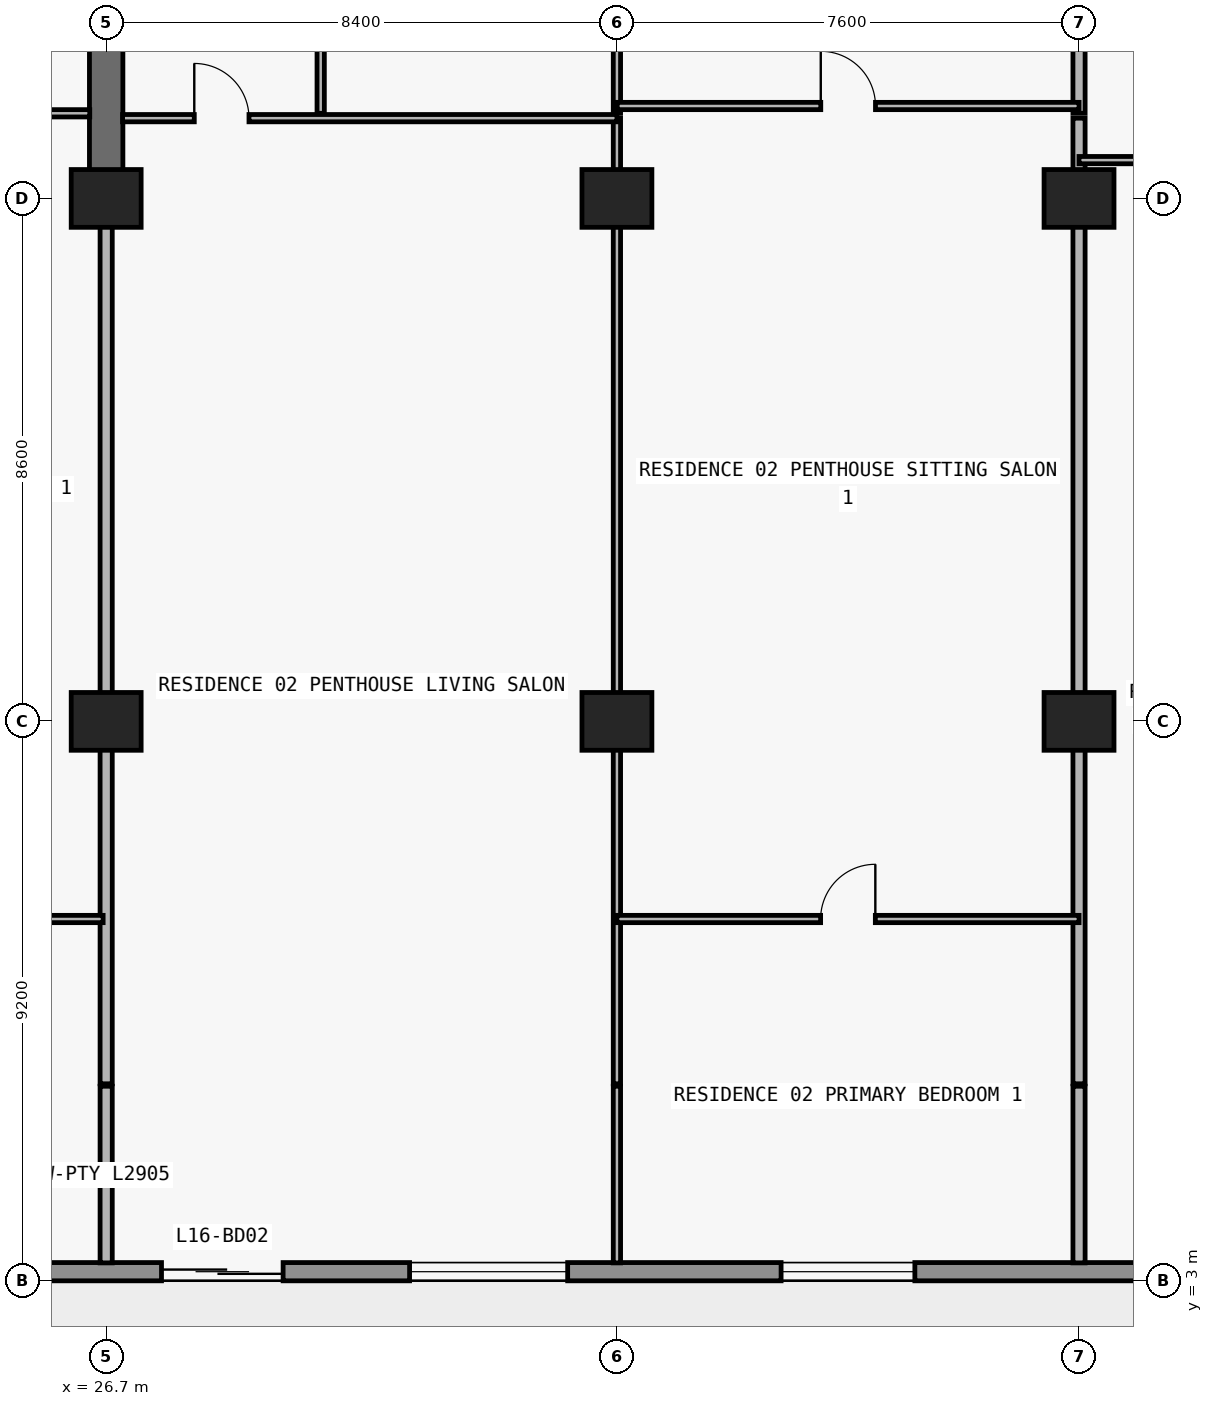
"""IFC4 building model, lengths in metres.
Left out: names, types, materials, properties, quantities, classifications, styles, units other than length and angle.
Written with IfcOpenShell. Run it as: python <this file> out.ifc"""

import sys

from ifc_helpers import new_model, si_unit, direction, frame, frame_2d, origin, origin_2d, place, context, subcontext, project, spatial, rectangle, extrude, element, fill, save


model = new_model("IFC4")
c1 = context("Model", 3, precision=1e-05, world=origin(), true_north=direction((0.0, 1.0)))
c2 = subcontext(c1, "Body", "Model", "MODEL_VIEW")
j1 = project(units=[si_unit("LENGTHUNIT", "METRE"), si_unit("PLANEANGLEUNIT", "RADIAN")], contexts=[c1])
p1 = place(None, origin())
s1 = spatial("IfcSite", under=j1, at=p1, CompositionType="ELEMENT")
p2 = place(p1, origin())
s2 = spatial("IfcBuilding", under=s1, at=p2, CompositionType="ELEMENT")
p3 = place(p2, frame((0.0, 0.0, 63.0)))
s3 = spatial("IfcBuildingStorey", under=s2, at=p3, CompositionType="ELEMENT", Elevation=63.0)
for number, where, z_axis, x_axis in (
    (1, (26.7, 12.2, 0.0), (0.0, 0.0, 1.0), (1.0, 0.0, 0.0)),
    (2, (35.1, 12.2, 0.0), (0.0, 0.0, 1.0), (1.0, 0.0, 0.0)),
    (3, (42.7, 12.2, 0.0), (0.0, 0.0, 1.0), (1.0, 0.0, 0.0)),
    (4, (26.7, 20.8, 0.0), (0.0, 0.0, 1.0), (1.0, 0.0, 0.0)),
    (5, (35.1, 20.8, 0.0), (0.0, 0.0, 1.0), (1.0, 0.0, 0.0)),
    (6, (42.7, 20.8, 0.0), (0.0, 0.0, 1.0), (1.0, 0.0, 0.0)),
):
    element("IfcColumn", number, at=place(p3, frame(where, z_axis=z_axis, x_axis=x_axis)), inside=s3, PredefinedType="COLUMN", context=c2, shape_type="SweptSolid", body=[
        extrude(rectangle(XDim=1.15, YDim=0.95, at=origin_2d()), origin(), (0.0, 0.0, 1.0), 3.05),
    ])
p4 = place(p3, frame((26.7, 20.8, 0.0), z_axis=(0.0, 0.0, 1.0), x_axis=(0.0, 1.0, 0.0)))
e7 = element("IfcWall", 7, at=p4, inside=s3, PredefinedType="SHEAR", context=c2, shape_type="SweptSolid", body=[
    extrude(rectangle(XDim=8.6, YDim=0.55, at=frame_2d((4.3, 0.0))), origin(), (0.0, 0.0, 1.0), 3.05),
])
p5 = place(p3, frame((72.7, 3.15, 0.0), z_axis=(0.0, 0.0, 1.0), x_axis=(-1.0, 0.0, 0.0)))
e8 = element("IfcWall", 8, at=p5, inside=s3, PredefinedType="STANDARD", context=c2, shape_type="SweptSolid", body=[
    extrude(rectangle(XDim=67.6, YDim=0.3, at=frame_2d((33.8, 0.0))), origin(), (0.0, 0.0, 1.0), 3.05),
])
p6 = place(p5, frame((59.89, 0.0, 0.0)))
e9 = element("IfcOpeningElement", 9, at=p6, cuts=e8, PredefinedType="OPENING", context=c2, shape_type="SweptSolid", body=[
    extrude(rectangle(XDim=2.0, YDim=2.3, at=frame_2d((1.0, 1.15))), frame((0.0, 0.16, 0.0), z_axis=(0.0, -1.0, 0.0), x_axis=(1.0, 0.0, 0.0)), (0.0, 0.0, 1.0), 0.32),
])
p7 = place(p5, frame((55.21, 0.0, 0.65)))
e10 = element("IfcOpeningElement", 10, at=p7, cuts=e8, PredefinedType="OPENING", context=c2, shape_type="SweptSolid", body=[
    extrude(rectangle(XDim=2.6, YDim=1.85, at=frame_2d((1.3, 0.925))), frame((0.0, 0.16, 0.0), z_axis=(0.0, -1.0, 0.0), x_axis=(1.0, 0.0, 0.0)), (0.0, 0.0, 1.0), 0.32),
])
p8 = place(p5, frame((49.1, 0.0, 0.85)))
e11 = element("IfcOpeningElement", 11, at=p8, cuts=e8, PredefinedType="OPENING", context=c2, shape_type="SweptSolid", body=[
    extrude(rectangle(XDim=2.2, YDim=1.55, at=frame_2d((1.1, 0.775))), frame((0.0, 0.16, 0.0), z_axis=(0.0, -1.0, 0.0), x_axis=(1.0, 0.0, 0.0)), (0.0, 0.0, 1.0), 0.32),
])
p9 = place(p5, frame((43.09, 0.0, 0.0)))
e12 = element("IfcOpeningElement", 12, at=p9, cuts=e8, PredefinedType="OPENING", context=c2, shape_type="SweptSolid", body=[
    extrude(rectangle(XDim=2.0, YDim=2.3, at=frame_2d((1.0, 1.15))), frame((0.0, 0.16, 0.0), z_axis=(0.0, -1.0, 0.0), x_axis=(1.0, 0.0, 0.0)), (0.0, 0.0, 1.0), 0.32),
])
p10 = place(p5, frame((38.41, 0.0, 0.65)))
e13 = element("IfcOpeningElement", 13, at=p10, cuts=e8, PredefinedType="OPENING", context=c2, shape_type="SweptSolid", body=[
    extrude(rectangle(XDim=2.6, YDim=1.85, at=frame_2d((1.3, 0.925))), frame((0.0, 0.16, 0.0), z_axis=(0.0, -1.0, 0.0), x_axis=(1.0, 0.0, 0.0)), (0.0, 0.0, 1.0), 0.32),
])
p11 = place(p5, frame((32.7, 0.0, 0.85)))
e14 = element("IfcOpeningElement", 14, at=p11, cuts=e8, PredefinedType="OPENING", context=c2, shape_type="SweptSolid", body=[
    extrude(rectangle(XDim=2.2, YDim=1.55, at=frame_2d((1.1, 0.775))), frame((0.0, 0.16, 0.0), z_axis=(0.0, -1.0, 0.0), x_axis=(1.0, 0.0, 0.0)), (0.0, 0.0, 1.0), 0.32),
])
p12 = place(p5, frame((27.026, 0.0, 0.0)))
e15 = element("IfcOpeningElement", 15, at=p12, cuts=e8, PredefinedType="OPENING", context=c2, shape_type="SweptSolid", body=[
    extrude(rectangle(XDim=2.0, YDim=2.3, at=frame_2d((1.0, 1.15))), frame((0.0, 0.16, 0.0), z_axis=(0.0, -1.0, 0.0), x_axis=(1.0, 0.0, 0.0)), (0.0, 0.0, 1.0), 0.32),
])
p13 = place(p5, frame((22.726, 0.0, 0.85)))
e16 = element("IfcOpeningElement", 16, at=p13, cuts=e8, PredefinedType="OPENING", context=c2, shape_type="SweptSolid", body=[
    extrude(rectangle(XDim=2.2, YDim=1.55, at=frame_2d((1.1, 0.775))), frame((0.0, 0.16, 0.0), z_axis=(0.0, -1.0, 0.0), x_axis=(1.0, 0.0, 0.0)), (0.0, 0.0, 1.0), 0.32),
])
p14 = place(p5, frame((18.29, 0.0, 0.0)))
e17 = element("IfcOpeningElement", 17, at=p14, cuts=e8, PredefinedType="OPENING", context=c2, shape_type="SweptSolid", body=[
    extrude(rectangle(XDim=2.0, YDim=2.3, at=frame_2d((1.0, 1.15))), frame((0.0, 0.16, 0.0), z_axis=(0.0, -1.0, 0.0), x_axis=(1.0, 0.0, 0.0)), (0.0, 0.0, 1.0), 0.32),
])
p15 = place(p5, frame((14.19, 0.0, 0.85)))
e18 = element("IfcOpeningElement", 18, at=p15, cuts=e8, PredefinedType="OPENING", context=c2, shape_type="SweptSolid", body=[
    extrude(rectangle(XDim=1.8, YDim=1.55, at=frame_2d((0.9, 0.775))), frame((0.0, 0.16, 0.0), z_axis=(0.0, -1.0, 0.0), x_axis=(1.0, 0.0, 0.0)), (0.0, 0.0, 1.0), 0.32),
])
p16 = place(p5, frame((10.226, 0.0, 0.0)))
e19 = element("IfcOpeningElement", 19, at=p16, cuts=e8, PredefinedType="OPENING", context=c2, shape_type="SweptSolid", body=[
    extrude(rectangle(XDim=2.0, YDim=2.3, at=frame_2d((1.0, 1.15))), frame((0.0, 0.16, 0.0), z_axis=(0.0, -1.0, 0.0), x_axis=(1.0, 0.0, 0.0)), (0.0, 0.0, 1.0), 0.32),
])
p17 = place(p5, frame((5.926, 0.0, 0.85)))
e20 = element("IfcOpeningElement", 20, at=p17, cuts=e8, PredefinedType="OPENING", context=c2, shape_type="SweptSolid", body=[
    extrude(rectangle(XDim=2.2, YDim=1.55, at=frame_2d((1.1, 0.775))), frame((0.0, 0.16, 0.0), z_axis=(0.0, -1.0, 0.0), x_axis=(1.0, 0.0, 0.0)), (0.0, 0.0, 1.0), 0.32),
])
p18 = place(p3, frame((26.7, 3.295, 0.0), z_axis=(0.0, 0.0, 1.0), x_axis=(0.0, 1.0, 0.0)))
e21 = element("IfcWall", 21, at=p18, inside=s3, PredefinedType="PARTITIONING", context=c2, shape_type="SweptSolid", body=[
    extrude(rectangle(XDim=2.905, YDim=0.2, at=frame_2d((1.453, 0.0))), origin(), (0.0, 0.0, 1.0), 3.05),
])
p19 = place(p3, frame((26.7, 6.24, 0.0), z_axis=(0.0, 0.0, 1.0), x_axis=(0.0, 1.0, 0.0)))
e22 = element("IfcWall", 22, at=p19, inside=s3, PredefinedType="PARTITIONING", context=c2, shape_type="SweptSolid", body=[
    extrude(rectangle(XDim=14.555, YDim=0.2, at=frame_2d((7.277, 0.0))), origin(), (0.0, 0.0, 1.0), 2.11),
])
p20 = place(p3, frame((30.228, 22.2, 0.0), z_axis=(0.0, 0.0, 1.0), x_axis=(0.0, 1.0, 0.0)))
e23 = element("IfcWall", 23, at=p20, inside=s3, PredefinedType="PARTITIONING", context=c2, shape_type="SweptSolid", body=[
    extrude(rectangle(XDim=4.38, YDim=0.12, at=frame_2d((2.19, 0.0))), origin(), (0.0, 0.0, 1.0), 3.05),
])
p21 = place(p20, frame((1.74, 0.0, 0.0)))
e24 = element("IfcOpeningElement", 24, at=p21, cuts=e23, PredefinedType="OPENING", context=c2, shape_type="SweptSolid", body=[
    extrude(rectangle(XDim=0.9, YDim=2.15, at=frame_2d((0.45, 1.075))), frame((0.0, 0.07, 0.0), z_axis=(0.0, -1.0, 0.0), x_axis=(1.0, 0.0, 0.0)), (0.0, 0.0, 1.0), 0.14),
])
p22 = place(p3, frame((35.1, 3.295, 0.0), z_axis=(0.0, 0.0, 1.0), x_axis=(0.0, 1.0, 0.0)))
e25 = element("IfcWall", 25, at=p22, inside=s3, PredefinedType="PARTITIONING", context=c2, shape_type="SweptSolid", body=[
    extrude(rectangle(XDim=2.905, YDim=0.12, at=frame_2d((1.453, 0.0))), origin(), (0.0, 0.0, 1.0), 3.05),
])
p23 = place(p3, frame((35.1, 6.24, 0.0), z_axis=(0.0, 0.0, 1.0), x_axis=(0.0, 1.0, 0.0)))
e26 = element("IfcWall", 26, at=p23, inside=s3, PredefinedType="PARTITIONING", context=c2, shape_type="SweptSolid", body=[
    extrude(rectangle(XDim=15.88, YDim=0.12, at=frame_2d((7.94, 0.0))), origin(), (0.0, 0.0, 1.0), 2.11),
])
p24 = place(p3, frame((35.1, 22.2, 0.0), z_axis=(0.0, 0.0, 1.0), x_axis=(0.0, 1.0, 0.0)))
e27 = element("IfcWall", 27, at=p24, inside=s3, PredefinedType="PARTITIONING", context=c2, shape_type="SweptSolid", body=[
    extrude(rectangle(XDim=4.38, YDim=0.12, at=frame_2d((2.19, 0.0))), origin(), (0.0, 0.0, 1.0), 2.11),
])
p25 = place(p24, frame((1.8, 0.0, 0.0)))
e28 = element("IfcOpeningElement", 28, at=p25, cuts=e27, PredefinedType="OPENING", context=c2, shape_type="SweptSolid", body=[
    extrude(rectangle(XDim=0.9, YDim=2.06, at=frame_2d((0.45, 1.03))), frame((0.0, 0.07, 0.0), z_axis=(0.0, -1.0, 0.0), x_axis=(1.0, 0.0, 0.0)), (0.0, 0.0, 1.0), 0.14),
])
p26 = place(p3, frame((42.7, 3.295, 0.0), z_axis=(0.0, 0.0, 1.0), x_axis=(0.0, 1.0, 0.0)))
e29 = element("IfcWall", 29, at=p26, inside=s3, PredefinedType="PARTITIONING", context=c2, shape_type="SweptSolid", body=[
    extrude(rectangle(XDim=2.905, YDim=0.2, at=frame_2d((1.453, 0.0))), origin(), (0.0, 0.0, 1.0), 3.05),
])
p27 = place(p3, frame((42.7, 6.24, 0.0), z_axis=(0.0, 0.0, 1.0), x_axis=(0.0, 1.0, 0.0)))
e30 = element("IfcWall", 30, at=p27, inside=s3, PredefinedType="PARTITIONING", context=c2, shape_type="SweptSolid", body=[
    extrude(rectangle(XDim=15.88, YDim=0.2, at=frame_2d((7.94, 0.0))), origin(), (0.0, 0.0, 1.0), 2.11),
])
p28 = place(p3, frame((42.7, 22.2, 0.0), z_axis=(0.0, 0.0, 1.0), x_axis=(0.0, 1.0, 0.0)))
e31 = element("IfcWall", 31, at=p28, inside=s3, PredefinedType="PARTITIONING", context=c2, shape_type="SweptSolid", body=[
    extrude(rectangle(XDim=4.38, YDim=0.2, at=frame_2d((2.19, 0.0))), origin(), (0.0, 0.0, 1.0), 2.11),
])
p29 = place(p3, frame((18.3, 8.95, 0.0), z_axis=(0.0, 0.0, 1.0), x_axis=(1.0, 0.0, 0.0)))
e32 = element("IfcWall", 32, at=p29, inside=s3, PredefinedType="PARTITIONING", context=c2, shape_type="SweptSolid", body=[
    extrude(rectangle(XDim=8.35, YDim=0.12, at=frame_2d((4.175, 0.0))), origin(), (0.0, 0.0, 1.0), 3.05),
])
p30 = place(p29, frame((3.725, 0.0, 0.0)))
e33 = element("IfcOpeningElement", 33, at=p30, cuts=e32, PredefinedType="OPENING", context=c2, shape_type="SweptSolid", body=[
    extrude(rectangle(XDim=0.9, YDim=2.15, at=frame_2d((0.45, 1.075))), frame((0.0, 0.07, 0.0), z_axis=(0.0, -1.0, 0.0), x_axis=(1.0, 0.0, 0.0)), (0.0, 0.0, 1.0), 0.14),
])
p31 = place(p3, frame((35.1, 8.95, 0.0), z_axis=(0.0, 0.0, 1.0), x_axis=(1.0, 0.0, 0.0)))
e34 = element("IfcWall", 34, at=p31, inside=s3, PredefinedType="PARTITIONING", context=c2, shape_type="SweptSolid", body=[
    extrude(rectangle(XDim=7.6, YDim=0.12, at=frame_2d((3.8, 0.0))), origin(), (0.0, 0.0, 1.0), 3.05),
])
p32 = place(p31, frame((3.35, 0.0, 0.0)))
e35 = element("IfcOpeningElement", 35, at=p32, cuts=e34, PredefinedType="OPENING", context=c2, shape_type="SweptSolid", body=[
    extrude(rectangle(XDim=0.9, YDim=2.15, at=frame_2d((0.45, 1.075))), frame((0.0, 0.07, 0.0), z_axis=(0.0, -1.0, 0.0), x_axis=(1.0, 0.0, 0.0)), (0.0, 0.0, 1.0), 0.14),
])
p33 = place(p3, frame((42.7, 21.43, 0.0), z_axis=(0.0, 0.0, 1.0), x_axis=(1.0, 0.0, 0.0)))
e36 = element("IfcWall", 36, at=p33, inside=s3, PredefinedType="PARTITIONING", context=c2, shape_type="SweptSolid", body=[
    extrude(rectangle(XDim=8.13, YDim=0.12, at=frame_2d((4.065, 0.0))), origin(), (0.0, 0.0, 1.0), 3.05),
])
p34 = place(p33, frame((1.524, 0.0, 0.0)))
e37 = element("IfcOpeningElement", 37, at=p34, cuts=e36, PredefinedType="OPENING", context=c2, shape_type="SweptSolid", body=[
    extrude(rectangle(XDim=0.9, YDim=2.15, at=frame_2d((0.45, 1.075))), frame((0.0, 0.07, 0.0), z_axis=(0.0, -1.0, 0.0), x_axis=(1.0, 0.0, 0.0)), (0.0, 0.0, 1.0), 0.14),
])
p35 = place(p33, frame((5.758, 0.0, 0.0)))
e38 = element("IfcOpeningElement", 38, at=p35, cuts=e36, PredefinedType="OPENING", context=c2, shape_type="SweptSolid", body=[
    extrude(rectangle(XDim=0.9, YDim=2.15, at=frame_2d((0.45, 1.075))), frame((0.0, 0.07, 0.0), z_axis=(0.0, -1.0, 0.0), x_axis=(1.0, 0.0, 0.0)), (0.0, 0.0, 1.0), 0.14),
])
p36 = place(p3, frame((26.97, 22.12, 0.0), z_axis=(0.0, 0.0, 1.0), x_axis=(1.0, 0.0, 0.0)))
e39 = element("IfcWall", 39, at=p36, inside=s3, PredefinedType="PARTITIONING", context=c2, shape_type="SweptSolid", body=[
    extrude(rectangle(XDim=8.13, YDim=0.12, at=frame_2d((4.065, 0.0))), origin(), (0.0, 0.0, 1.0), 3.05),
])
p37 = place(p36, frame((1.179, 0.0, 0.0)))
e40 = element("IfcOpeningElement", 40, at=p37, cuts=e39, PredefinedType="OPENING", context=c2, shape_type="SweptSolid", body=[
    extrude(rectangle(XDim=0.9, YDim=2.15, at=frame_2d((0.45, 1.075))), frame((0.0, 0.07, 0.0), z_axis=(0.0, -1.0, 0.0), x_axis=(1.0, 0.0, 0.0)), (0.0, 0.0, 1.0), 0.14),
])
p38 = place(p3, frame((18.305, 22.2, 0.0), z_axis=(0.0, 0.0, 1.0), x_axis=(1.0, 0.0, 0.0)))
e41 = element("IfcWall", 41, at=p38, inside=s3, PredefinedType="PARTITIONING", context=c2, shape_type="SweptSolid", body=[
    extrude(rectangle(XDim=8.125, YDim=0.12, at=frame_2d((4.062, 0.0))), origin(), (0.0, 0.0, 1.0), 3.05),
])
p39 = place(p38, frame((3.613, 0.0, 0.0)))
e42 = element("IfcOpeningElement", 42, at=p39, cuts=e41, PredefinedType="OPENING", context=c2, shape_type="SweptSolid", body=[
    extrude(rectangle(XDim=0.9, YDim=2.15, at=frame_2d((0.45, 1.075))), frame((0.0, 0.07, 0.0), z_axis=(0.0, -1.0, 0.0), x_axis=(1.0, 0.0, 0.0)), (0.0, 0.0, 1.0), 0.14),
])
p40 = place(p3, frame((35.105, 22.32, 0.0), z_axis=(0.0, 0.0, 1.0), x_axis=(1.0, 0.0, 0.0)))
e43 = element("IfcWall", 43, at=p40, inside=s3, PredefinedType="PARTITIONING", context=c2, shape_type="SweptSolid", body=[
    extrude(rectangle(XDim=7.595, YDim=0.12, at=frame_2d((3.797, 0.0))), origin(), (0.0, 0.0, 1.0), 3.05),
])
p41 = place(p40, frame((3.347, 0.0, 0.0)))
e44 = element("IfcOpeningElement", 44, at=p41, cuts=e43, PredefinedType="OPENING", context=c2, shape_type="SweptSolid", body=[
    extrude(rectangle(XDim=0.9, YDim=2.15, at=frame_2d((0.45, 1.075))), frame((0.0, 0.07, 0.0), z_axis=(0.0, -1.0, 0.0), x_axis=(1.0, 0.0, 0.0)), (0.0, 0.0, 1.0), 0.14),
])
p42 = place(p9, origin())
e45 = element("IfcDoor", 45, at=p42, inside=s3, OperationType="DOUBLE_DOOR_SLIDING", PredefinedType="DOOR", context=c2, shape_type="SweptSolid", body=[
    extrude(rectangle(XDim=2.0, YDim=2.3, at=frame_2d((1.0, 1.15))), frame((0.0, 0.025, 0.0), z_axis=(0.0, -1.0, 0.0), x_axis=(1.0, 0.0, 0.0)), (0.0, 0.0, 1.0), 0.05),
])
fill(e12, e45)
p43 = place(p10, origin())
e46 = element("IfcWindow", 46, at=p43, inside=s3, PartitioningType="SINGLE_PANEL", PredefinedType="WINDOW", context=c2, shape_type="SweptSolid", body=[
    extrude(rectangle(XDim=2.6, YDim=1.85, at=frame_2d((1.3, 0.925))), frame((0.0, 0.03, 0.0), z_axis=(0.0, -1.0, 0.0), x_axis=(1.0, 0.0, 0.0)), (0.0, 0.0, 1.0), 0.06),
])
fill(e13, e46)
p44 = place(p11, origin())
e47 = element("IfcWindow", 47, at=p44, inside=s3, PartitioningType="SINGLE_PANEL", PredefinedType="WINDOW", context=c2, shape_type="SweptSolid", body=[
    extrude(rectangle(XDim=2.2, YDim=1.55, at=frame_2d((1.1, 0.775))), frame((0.0, 0.03, 0.0), z_axis=(0.0, -1.0, 0.0), x_axis=(1.0, 0.0, 0.0)), (0.0, 0.0, 1.0), 0.06),
])
fill(e14, e47)
p45 = place(p37, origin())
e48 = element("IfcDoor", 48, at=p45, inside=s3, OperationType="SINGLE_SWING_LEFT", PredefinedType="DOOR", context=c2, shape_type="SweptSolid", body=[
    extrude(rectangle(XDim=0.9, YDim=2.15, at=frame_2d((0.45, 1.075))), frame((0.0, 0.025, 0.0), z_axis=(0.0, -1.0, 0.0), x_axis=(1.0, 0.0, 0.0)), (0.0, 0.0, 1.0), 0.05),
])
fill(e40, e48)
p46 = place(p41, origin())
e49 = element("IfcDoor", 49, at=p46, inside=s3, OperationType="SINGLE_SWING_LEFT", PredefinedType="DOOR", context=c2, shape_type="SweptSolid", body=[
    extrude(rectangle(XDim=0.9, YDim=2.15, at=frame_2d((0.45, 1.075))), frame((0.0, 0.025, 0.0), z_axis=(0.0, -1.0, 0.0), x_axis=(1.0, 0.0, 0.0)), (0.0, 0.0, 1.0), 0.05),
])
fill(e44, e49)
p47 = place(p32, origin())
e50 = element("IfcDoor", 50, at=p47, inside=s3, OperationType="SINGLE_SWING_RIGHT", PredefinedType="DOOR", context=c2, shape_type="SweptSolid", body=[
    extrude(rectangle(XDim=0.9, YDim=2.15, at=frame_2d((0.45, 1.075))), frame((0.0, 0.025, 0.0), z_axis=(0.0, -1.0, 0.0), x_axis=(1.0, 0.0, 0.0)), (0.0, 0.0, 1.0), 0.05),
])
fill(e35, e50)
save(model, sys.argv[1])
